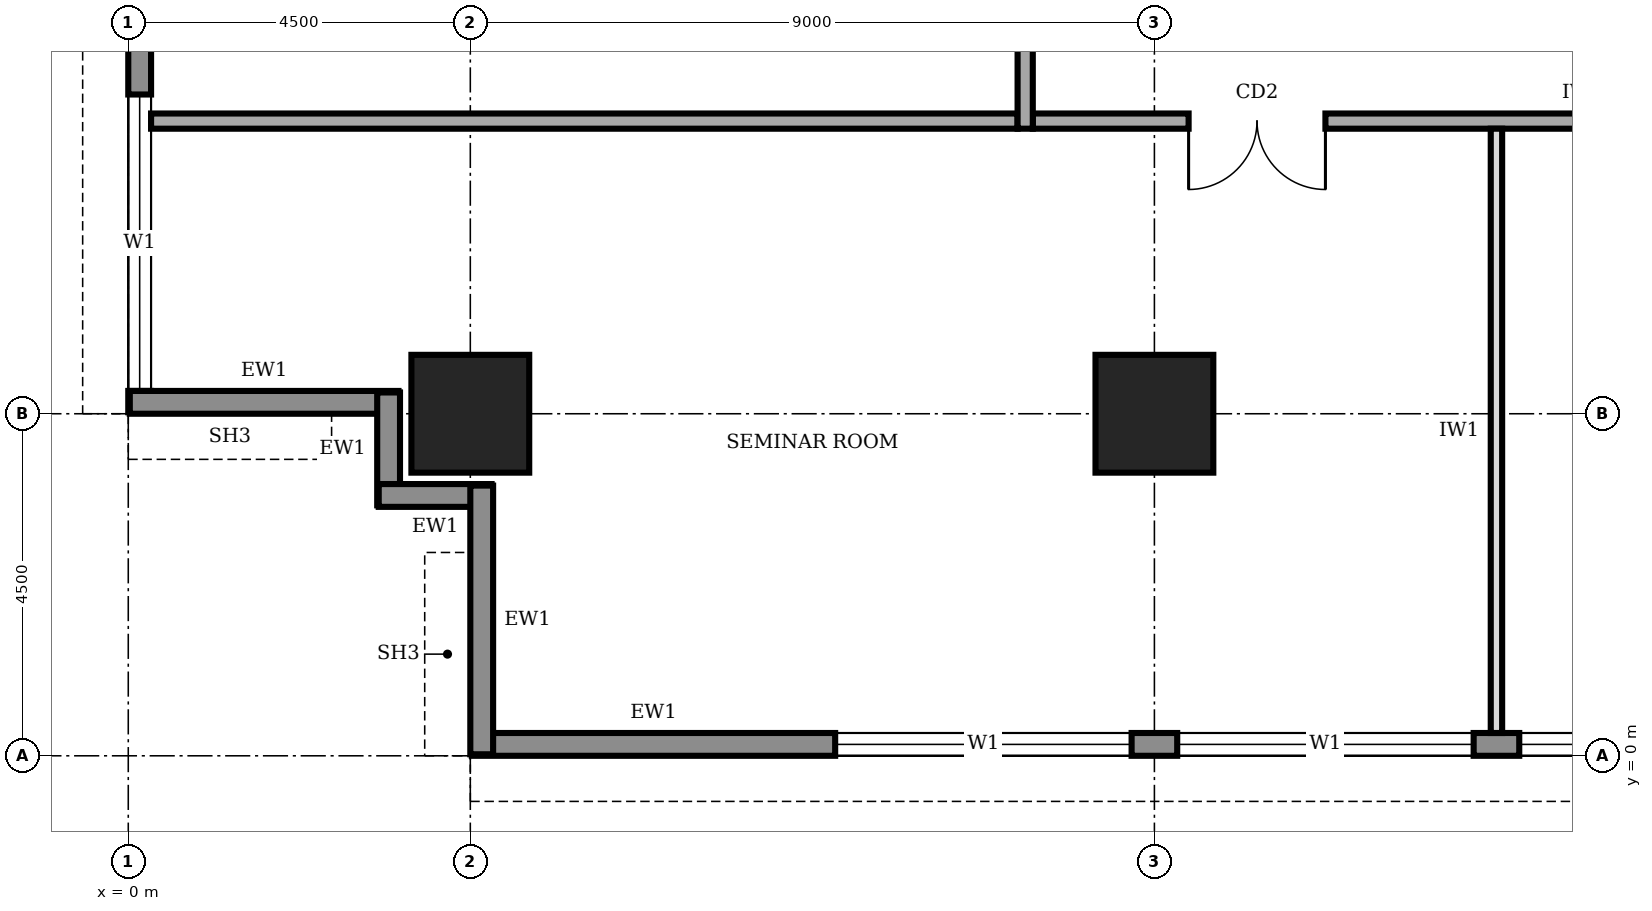
"""IFC4 building model, lengths in metres.
Left out: names, types, materials, properties, quantities, classifications, styles, units other than length and angle.
Written with IfcOpenShell. Run it as: python <this file> out.ifc"""

import sys

from ifc_helpers import new_model, si_unit, direction, frame, frame_2d, origin, origin_2d, place, context, subcontext, project, spatial, rectangle, extrude, element, fill, save


model = new_model("IFC4")
c1 = context("Model", 3, precision=1e-05, world=origin(), true_north=direction((0.0, 1.0)))
c2 = subcontext(c1, "Body", "Model", "MODEL_VIEW")
j1 = project(units=[si_unit("LENGTHUNIT", "METRE"), si_unit("PLANEANGLEUNIT", "RADIAN")], contexts=[c1])
p1 = place(None, origin())
s1 = spatial("IfcSite", under=j1, at=p1, CompositionType="ELEMENT")
p2 = place(p1, origin())
s2 = spatial("IfcBuilding", under=s1, at=p2, CompositionType="ELEMENT")
p3 = place(p2, frame((0.0, 0.0, 221.0)))
s3 = spatial("IfcBuildingStorey", under=s2, at=p3, CompositionType="ELEMENT", Elevation=221.0)
for number, where, z_axis, x_axis in (
    (1, (4.5, 4.5, 0.0), (0.0, 0.0, 1.0), (1.0, 0.0, 0.0)),
    (2, (13.5, 4.5, 0.0), (0.0, 0.0, 1.0), (1.0, 0.0, 0.0)),
):
    element("IfcColumn", number, at=place(p3, frame(where, z_axis=z_axis, x_axis=x_axis)), inside=s3, PredefinedType="COLUMN", context=c2, shape_type="SweptSolid", body=[
        extrude(rectangle(XDim=1.55, YDim=1.55, at=origin_2d()), origin(), (0.0, 0.0, 1.0), 4.0),
    ])
p4 = place(p3, frame((4.52, 0.15, 0.0), z_axis=(0.0, 0.0, 1.0), x_axis=(1.0, 0.0, 0.0)))
e3 = element("IfcWall", 3, at=p4, inside=s3, PredefinedType="STANDARD", context=c2, shape_type="SweptSolid", body=[
    extrude(rectangle(XDim=31.46, YDim=0.3, at=frame_2d((15.73, 0.0))), origin(), (0.0, 0.0, 1.0), 3.75),
])
p5 = place(p4, frame((4.78, 0.0, 0.9)))
e4 = element("IfcOpeningElement", 4, at=p5, cuts=e3, PredefinedType="OPENING", context=c2, shape_type="SweptSolid", body=[
    extrude(rectangle(XDim=3.9, YDim=2.2, at=frame_2d((1.95, 1.1))), frame((0.0, 0.16, 0.0), z_axis=(0.0, -1.0, 0.0), x_axis=(1.0, 0.0, 0.0)), (0.0, 0.0, 1.0), 0.32),
])
p6 = place(p4, frame((9.28, 0.0, 0.9)))
e5 = element("IfcOpeningElement", 5, at=p6, cuts=e3, PredefinedType="OPENING", context=c2, shape_type="SweptSolid", body=[
    extrude(rectangle(XDim=3.9, YDim=2.2, at=frame_2d((1.95, 1.1))), frame((0.0, 0.16, 0.0), z_axis=(0.0, -1.0, 0.0), x_axis=(1.0, 0.0, 0.0)), (0.0, 0.0, 1.0), 0.32),
])
p7 = place(p4, frame((13.78, 0.0, 0.9)))
e6 = element("IfcOpeningElement", 6, at=p7, cuts=e3, PredefinedType="OPENING", context=c2, shape_type="SweptSolid", body=[
    extrude(rectangle(XDim=3.9, YDim=2.2, at=frame_2d((1.95, 1.1))), frame((0.0, 0.16, 0.0), z_axis=(0.0, -1.0, 0.0), x_axis=(1.0, 0.0, 0.0)), (0.0, 0.0, 1.0), 0.32),
])
p8 = place(p4, frame((18.28, 0.0, 0.9)))
e7 = element("IfcOpeningElement", 7, at=p8, cuts=e3, PredefinedType="OPENING", context=c2, shape_type="SweptSolid", body=[
    extrude(rectangle(XDim=3.9, YDim=2.2, at=frame_2d((1.95, 1.1))), frame((0.0, 0.16, 0.0), z_axis=(0.0, -1.0, 0.0), x_axis=(1.0, 0.0, 0.0)), (0.0, 0.0, 1.0), 0.32),
])
p9 = place(p4, frame((22.78, 0.0, 0.9)))
e8 = element("IfcOpeningElement", 8, at=p9, cuts=e3, PredefinedType="OPENING", context=c2, shape_type="SweptSolid", body=[
    extrude(rectangle(XDim=3.9, YDim=2.2, at=frame_2d((1.95, 1.1))), frame((0.0, 0.16, 0.0), z_axis=(0.0, -1.0, 0.0), x_axis=(1.0, 0.0, 0.0)), (0.0, 0.0, 1.0), 0.32),
])
p10 = place(p4, frame((27.28, 0.0, 0.9)))
e9 = element("IfcOpeningElement", 9, at=p10, cuts=e3, PredefinedType="OPENING", context=c2, shape_type="SweptSolid", body=[
    extrude(rectangle(XDim=3.9, YDim=2.2, at=frame_2d((1.95, 1.1))), frame((0.0, 0.16, 0.0), z_axis=(0.0, -1.0, 0.0), x_axis=(1.0, 0.0, 0.0)), (0.0, 0.0, 1.0), 0.32),
])
p11 = place(p3, frame((0.15, 35.98, 0.0), z_axis=(0.0, 0.0, 1.0), x_axis=(0.0, -1.0, 0.0)))
e10 = element("IfcWall", 10, at=p11, inside=s3, PredefinedType="STANDARD", context=c2, shape_type="SweptSolid", body=[
    extrude(rectangle(XDim=31.46, YDim=0.3, at=frame_2d((15.73, 0.0))), origin(), (0.0, 0.0, 1.0), 3.75),
])
p12 = place(p11, frame((27.28, 0.0, 0.9)))
e11 = element("IfcOpeningElement", 11, at=p12, cuts=e10, PredefinedType="OPENING", context=c2, shape_type="SweptSolid", body=[
    extrude(rectangle(XDim=3.9, YDim=2.2, at=frame_2d((1.95, 1.1))), frame((0.0, 0.16, 0.0), z_axis=(0.0, -1.0, 0.0), x_axis=(1.0, 0.0, 0.0)), (0.0, 0.0, 1.0), 0.32),
])
p13 = place(p11, frame((22.78, 0.0, 0.9)))
e12 = element("IfcOpeningElement", 12, at=p13, cuts=e10, PredefinedType="OPENING", context=c2, shape_type="SweptSolid", body=[
    extrude(rectangle(XDim=3.9, YDim=2.2, at=frame_2d((1.95, 1.1))), frame((0.0, 0.16, 0.0), z_axis=(0.0, -1.0, 0.0), x_axis=(1.0, 0.0, 0.0)), (0.0, 0.0, 1.0), 0.32),
])
p14 = place(p11, frame((18.28, 0.0, 0.9)))
e13 = element("IfcOpeningElement", 13, at=p14, cuts=e10, PredefinedType="OPENING", context=c2, shape_type="SweptSolid", body=[
    extrude(rectangle(XDim=3.9, YDim=2.2, at=frame_2d((1.95, 1.1))), frame((0.0, 0.16, 0.0), z_axis=(0.0, -1.0, 0.0), x_axis=(1.0, 0.0, 0.0)), (0.0, 0.0, 1.0), 0.32),
])
p15 = place(p11, frame((13.78, 0.0, 0.9)))
e14 = element("IfcOpeningElement", 14, at=p15, cuts=e10, PredefinedType="OPENING", context=c2, shape_type="SweptSolid", body=[
    extrude(rectangle(XDim=3.9, YDim=2.2, at=frame_2d((1.95, 1.1))), frame((0.0, 0.16, 0.0), z_axis=(0.0, -1.0, 0.0), x_axis=(1.0, 0.0, 0.0)), (0.0, 0.0, 1.0), 0.32),
])
p16 = place(p11, frame((9.28, 0.0, 0.9)))
e15 = element("IfcOpeningElement", 15, at=p16, cuts=e10, PredefinedType="OPENING", context=c2, shape_type="SweptSolid", body=[
    extrude(rectangle(XDim=3.9, YDim=2.2, at=frame_2d((1.95, 1.1))), frame((0.0, 0.16, 0.0), z_axis=(0.0, -1.0, 0.0), x_axis=(1.0, 0.0, 0.0)), (0.0, 0.0, 1.0), 0.32),
])
p17 = place(p11, frame((4.78, 0.0, 0.9)))
e16 = element("IfcOpeningElement", 16, at=p17, cuts=e10, PredefinedType="OPENING", context=c2, shape_type="SweptSolid", body=[
    extrude(rectangle(XDim=3.9, YDim=2.2, at=frame_2d((1.95, 1.1))), frame((0.0, 0.16, 0.0), z_axis=(0.0, -1.0, 0.0), x_axis=(1.0, 0.0, 0.0)), (0.0, 0.0, 1.0), 0.32),
])
p18 = place(p3, frame((0.02, 4.65, 0.0), z_axis=(0.0, 0.0, 1.0), x_axis=(1.0, 0.0, 0.0)))
e17 = element("IfcWall", 17, at=p18, inside=s3, PredefinedType="STANDARD", context=c2, shape_type="SweptSolid", body=[
    extrude(rectangle(XDim=3.535, YDim=0.3, at=frame_2d((1.768, 0.0))), origin(), (0.0, 0.0, 1.0), 2.85),
])
for number, where, z_axis, x_axis in (
    (18, (3.425, 4.78, 0.0), (0.0, 0.0, 1.0), (0.0, -1.0, 0.0)),
    (19, (3.295, 3.425, 0.0), (0.0, 0.0, 1.0), (1.0, 0.0, 0.0)),
):
    element("IfcWall", number, at=place(p3, frame(where, z_axis=z_axis, x_axis=x_axis)), inside=s3, PredefinedType="STANDARD", context=c2, shape_type="SweptSolid", body=[
        extrude(rectangle(XDim=1.485, YDim=0.3, at=frame_2d((0.743, 0.0))), origin(), (0.0, 0.0, 1.0), 3.75),
    ])
p19 = place(p3, frame((4.65, 3.555, 0.0), z_axis=(0.0, 0.0, 1.0), x_axis=(0.0, -1.0, 0.0)))
e20 = element("IfcWall", 20, at=p19, inside=s3, PredefinedType="STANDARD", context=c2, shape_type="SweptSolid", body=[
    extrude(rectangle(XDim=3.535, YDim=0.3, at=frame_2d((1.768, 0.0))), origin(), (0.0, 0.0, 1.0), 2.85),
])
p20 = place(p3, frame((11.9, 8.35, 0.0), z_axis=(0.0, 0.0, 1.0), x_axis=(1.0, 0.0, 0.0)))
e21 = element("IfcWall", 21, at=p20, inside=s3, PredefinedType="SOLIDWALL", context=c2, shape_type="SweptSolid", body=[
    extrude(rectangle(XDim=16.9, YDim=0.2, at=frame_2d((8.45, 0.0))), origin(), (0.0, 0.0, 1.0), 3.75),
])
p21 = place(p20, frame((2.05, 0.0, 0.0)))
e22 = element("IfcOpeningElement", 22, at=p21, cuts=e21, PredefinedType="OPENING", context=c2, shape_type="SweptSolid", body=[
    extrude(rectangle(XDim=1.8, YDim=2.1, at=frame_2d((0.9, 1.05))), frame((0.0, 0.11, 0.0), z_axis=(0.0, -1.0, 0.0), x_axis=(1.0, 0.0, 0.0)), (0.0, 0.0, 1.0), 0.22),
])
p22 = place(p20, frame((10.6, 0.0, 0.0)))
e23 = element("IfcOpeningElement", 23, at=p22, cuts=e21, PredefinedType="OPENING", context=c2, shape_type="SweptSolid", body=[
    extrude(rectangle(XDim=1.8, YDim=2.1, at=frame_2d((0.9, 1.05))), frame((0.0, 0.11, 0.0), z_axis=(0.0, -1.0, 0.0), x_axis=(1.0, 0.0, 0.0)), (0.0, 0.0, 1.0), 0.22),
])
p23 = place(p3, frame((11.8, 32.05, 0.0), z_axis=(0.0, 0.0, 1.0), x_axis=(0.0, -1.0, 0.0)))
e24 = element("IfcWall", 24, at=p23, inside=s3, PredefinedType="SOLIDWALL", context=c2, shape_type="SweptSolid", body=[
    extrude(rectangle(XDim=23.8, YDim=0.2, at=frame_2d((11.9, 0.0))), origin(), (0.0, 0.0, 1.0), 3.75),
])
p24 = place(p23, frame((20.675, 0.0, 0.0)))
e25 = element("IfcOpeningElement", 25, at=p24, cuts=e24, PredefinedType="OPENING", context=c2, shape_type="SweptSolid", body=[
    extrude(rectangle(XDim=1.0, YDim=2.1, at=frame_2d((0.5, 1.05))), frame((0.0, 0.11, 0.0), z_axis=(0.0, -1.0, 0.0), x_axis=(1.0, 0.0, 0.0)), (0.0, 0.0, 1.0), 0.22),
])
p25 = place(p23, frame((16.4, 0.0, 0.0)))
e26 = element("IfcOpeningElement", 26, at=p25, cuts=e24, PredefinedType="OPENING", context=c2, shape_type="SweptSolid", body=[
    extrude(rectangle(XDim=0.9, YDim=2.1, at=frame_2d((0.45, 1.05))), frame((0.0, 0.11, 0.0), z_axis=(0.0, -1.0, 0.0), x_axis=(1.0, 0.0, 0.0)), (0.0, 0.0, 1.0), 0.22),
])
p26 = place(p23, frame((11.6, 0.0, 0.0)))
e27 = element("IfcOpeningElement", 27, at=p26, cuts=e24, PredefinedType="OPENING", context=c2, shape_type="SweptSolid", body=[
    extrude(rectangle(XDim=0.9, YDim=2.1, at=frame_2d((0.45, 1.05))), frame((0.0, 0.11, 0.0), z_axis=(0.0, -1.0, 0.0), x_axis=(1.0, 0.0, 0.0)), (0.0, 0.0, 1.0), 0.22),
])
p27 = place(p23, frame((8.55, 0.0, 0.0)))
e28 = element("IfcOpeningElement", 28, at=p27, cuts=e24, PredefinedType="OPENING", context=c2, shape_type="SweptSolid", body=[
    extrude(rectangle(XDim=0.9, YDim=2.1, at=frame_2d((0.45, 1.05))), frame((0.0, 0.11, 0.0), z_axis=(0.0, -1.0, 0.0), x_axis=(1.0, 0.0, 0.0)), (0.0, 0.0, 1.0), 0.22),
])
p28 = place(p23, frame((5.55, 0.0, 0.0)))
e29 = element("IfcOpeningElement", 29, at=p28, cuts=e24, PredefinedType="OPENING", context=c2, shape_type="SweptSolid", body=[
    extrude(rectangle(XDim=1.0, YDim=2.1, at=frame_2d((0.5, 1.05))), frame((0.0, 0.11, 0.0), z_axis=(0.0, -1.0, 0.0), x_axis=(1.0, 0.0, 0.0)), (0.0, 0.0, 1.0), 0.22),
])
p29 = place(p23, frame((13.65, 0.0, 0.0)))
e30 = element("IfcOpeningElement", 30, at=p29, cuts=e24, PredefinedType="OPENING", context=c2, shape_type="SweptSolid", body=[
    extrude(rectangle(XDim=1.0, YDim=2.1, at=frame_2d((0.5, 1.05))), frame((0.0, 0.11, 0.0), z_axis=(0.0, -1.0, 0.0), x_axis=(1.0, 0.0, 0.0)), (0.0, 0.0, 1.0), 0.22),
])
p30 = place(p23, frame((1.925, 0.0, 0.0)))
e31 = element("IfcOpeningElement", 31, at=p30, cuts=e24, PredefinedType="OPENING", context=c2, shape_type="SweptSolid", body=[
    extrude(rectangle(XDim=1.0, YDim=2.1, at=frame_2d((0.5, 1.05))), frame((0.0, 0.11, 0.0), z_axis=(0.0, -1.0, 0.0), x_axis=(1.0, 0.0, 0.0)), (0.0, 0.0, 1.0), 0.22),
])
p31 = place(p3, frame((0.3, 8.35, 0.0), z_axis=(0.0, 0.0, 1.0), x_axis=(1.0, 0.0, 0.0)))
e32 = element("IfcWall", 32, at=p31, inside=s3, PredefinedType="SOLIDWALL", context=c2, shape_type="SweptSolid", body=[
    extrude(rectangle(XDim=11.4, YDim=0.2, at=frame_2d((5.7, 0.0))), origin(), (0.0, 0.0, 1.0), 3.75),
])
p32 = place(p3, frame((18.0, 0.3, 0.0), z_axis=(0.0, 0.0, 1.0), x_axis=(0.0, 1.0, 0.0)))
e33 = element("IfcWall", 33, at=p32, inside=s3, PredefinedType="PARTITIONING", context=c2, shape_type="SweptSolid", body=[
    extrude(rectangle(XDim=7.95, YDim=0.15, at=frame_2d((3.975, 0.0))), origin(), (0.0, 0.0, 1.0), 3.75),
])
p33 = place(p5, origin())
e34 = element("IfcWindow", 34, at=p33, inside=s3, PartitioningType="SINGLE_PANEL", PredefinedType="WINDOW", context=c2, shape_type="SweptSolid", body=[
    extrude(rectangle(XDim=3.9, YDim=2.2, at=frame_2d((1.95, 1.1))), frame((0.0, 0.03, 0.0), z_axis=(0.0, -1.0, 0.0), x_axis=(1.0, 0.0, 0.0)), (0.0, 0.0, 1.0), 0.06),
])
fill(e4, e34)
p34 = place(p6, origin())
e35 = element("IfcWindow", 35, at=p34, inside=s3, PartitioningType="SINGLE_PANEL", PredefinedType="WINDOW", context=c2, shape_type="SweptSolid", body=[
    extrude(rectangle(XDim=3.9, YDim=2.2, at=frame_2d((1.95, 1.1))), frame((0.0, 0.03, 0.0), z_axis=(0.0, -1.0, 0.0), x_axis=(1.0, 0.0, 0.0)), (0.0, 0.0, 1.0), 0.06),
])
fill(e5, e35)
p35 = place(p7, origin())
e36 = element("IfcWindow", 36, at=p35, inside=s3, PartitioningType="SINGLE_PANEL", PredefinedType="WINDOW", context=c2, shape_type="SweptSolid", body=[
    extrude(rectangle(XDim=3.9, YDim=2.2, at=frame_2d((1.95, 1.1))), frame((0.0, 0.03, 0.0), z_axis=(0.0, -1.0, 0.0), x_axis=(1.0, 0.0, 0.0)), (0.0, 0.0, 1.0), 0.06),
])
fill(e6, e36)
p36 = place(p12, origin())
e37 = element("IfcWindow", 37, at=p36, inside=s3, PartitioningType="SINGLE_PANEL", PredefinedType="WINDOW", context=c2, shape_type="SweptSolid", body=[
    extrude(rectangle(XDim=3.9, YDim=2.2, at=frame_2d((1.95, 1.1))), frame((0.0, 0.03, 0.0), z_axis=(0.0, -1.0, 0.0), x_axis=(1.0, 0.0, 0.0)), (0.0, 0.0, 1.0), 0.06),
])
fill(e11, e37)
p37 = place(p21, frame((1.8, 0.0, 0.0), z_axis=(0.0, 0.0, 1.0), x_axis=(-1.0, 0.0, 0.0)))
e38 = element("IfcDoor", 38, at=p37, inside=s3, OperationType="DOUBLE_DOOR_SINGLE_SWING", PredefinedType="DOOR", context=c2, shape_type="SweptSolid", body=[
    extrude(rectangle(XDim=1.8, YDim=2.1, at=frame_2d((0.9, 1.05))), frame((0.0, 0.025, 0.0), z_axis=(0.0, -1.0, 0.0), x_axis=(1.0, 0.0, 0.0)), (0.0, 0.0, 1.0), 0.05),
])
fill(e22, e38)
save(model, sys.argv[1])
